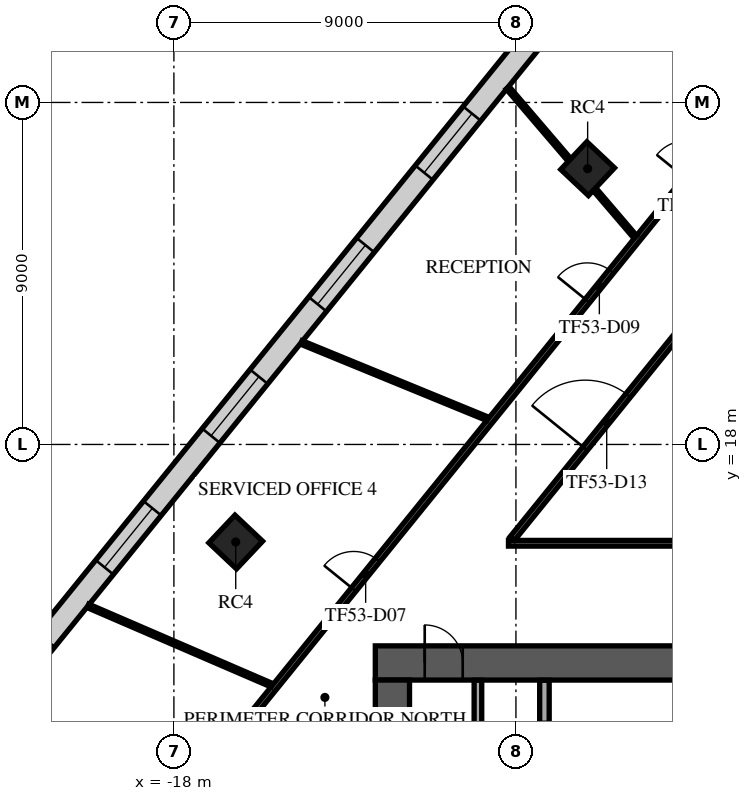
"""IFC4 building model, lengths in metres.
Left out: names, types, materials, properties, quantities, classifications, styles, units other than length and angle.
Written with IfcOpenShell. Run it as: python <this file> out.ifc"""

import sys

from ifc_helpers import new_model, si_unit, direction, frame, frame_2d, origin, origin_2d, place, context, subcontext, project, spatial, rectangle, extrude, element, fill, save


model = new_model("IFC4")
c1 = context("Model", 3, precision=1e-05, world=origin(), true_north=direction((0.0, 1.0)))
c2 = subcontext(c1, "Body", "Model", "MODEL_VIEW")
j1 = project(units=[si_unit("LENGTHUNIT", "METRE"), si_unit("PLANEANGLEUNIT", "RADIAN")], contexts=[c1])
p1 = place(None, origin())
s1 = spatial("IfcSite", under=j1, at=p1, CompositionType="ELEMENT")
p2 = place(p1, origin())
s2 = spatial("IfcBuilding", under=s1, at=p2, CompositionType="ELEMENT")
p3 = place(p2, frame((0.0, 0.0, 225.3)))
s3 = spatial("IfcBuildingStorey", under=s2, at=p3, CompositionType="ELEMENT", Elevation=225.3)
for number, where, z_axis, x_axis in (
    (1, (-7.113, 25.257, 0.0), (0.0, 0.0, 1.0), (0.686, 0.728, 0.0)),
    (2, (-16.373, 15.433, 0.0), (0.0, 0.0, 1.0), (0.686, 0.728, 0.0)),
):
    element("IfcColumn", number, at=place(p3, frame(where, z_axis=z_axis, x_axis=x_axis)), inside=s3, PredefinedType="COLUMN", context=c2, shape_type="SweptSolid", body=[
        extrude(rectangle(XDim=1.0, YDim=1.0, at=origin_2d()), origin(), (0.0, 0.0, 1.0), 4.0),
    ])
p4 = place(p3, frame((-12.7, 12.25, 0.0), z_axis=(0.0, 0.0, 1.0), x_axis=(1.0, 0.0, 0.0)))
e3 = element("IfcWall", 3, at=p4, inside=s3, PredefinedType="SHEAR", context=c2, shape_type="SweptSolid", body=[
    extrude(rectangle(XDim=25.4, YDim=0.9, at=frame_2d((12.7, 0.0))), origin(), (0.0, 0.0, 1.0), 3.62),
])
p5 = place(p4, frame((11.5, 0.0, 0.0)))
e4 = element("IfcOpeningElement", 4, at=p5, cuts=e3, PredefinedType="OPENING", context=c2, shape_type="SweptSolid", body=[
    extrude(rectangle(XDim=2.4, YDim=2.4, at=frame_2d((1.2, 1.2))), frame((0.0, 0.46, 0.0), z_axis=(0.0, -1.0, 0.0), x_axis=(1.0, 0.0, 0.0)), (0.0, 0.0, 1.0), 0.92),
])
p6 = place(p4, frame((22.325, 0.0, 0.0)))
e5 = element("IfcOpeningElement", 5, at=p6, cuts=e3, PredefinedType="OPENING", context=c2, shape_type="SweptSolid", body=[
    extrude(rectangle(XDim=1.2, YDim=2.1, at=frame_2d((0.6, 1.05))), frame((0.0, 0.46, 0.0), z_axis=(0.0, -1.0, 0.0), x_axis=(1.0, 0.0, 0.0)), (0.0, 0.0, 1.0), 0.92),
])
p7 = place(p4, frame((1.3, 0.0, 0.0)))
e6 = element("IfcOpeningElement", 6, at=p7, cuts=e3, PredefinedType="OPENING", context=c2, shape_type="SweptSolid", body=[
    extrude(rectangle(XDim=1.0, YDim=2.1, at=frame_2d((0.5, 1.05))), frame((0.0, 0.46, 0.0), z_axis=(0.0, -1.0, 0.0), x_axis=(1.0, 0.0, 0.0)), (0.0, 0.0, 1.0), 0.92),
])
p8 = place(p3, frame((-12.25, -11.8, 0.0), z_axis=(0.0, 0.0, 1.0), x_axis=(0.0, 1.0, 0.0)))
e7 = element("IfcWall", 7, at=p8, inside=s3, PredefinedType="SHEAR", context=c2, shape_type="SweptSolid", body=[
    extrude(rectangle(XDim=23.6, YDim=0.9, at=frame_2d((11.8, 0.0))), origin(), (0.0, 0.0, 1.0), 3.62),
])
p9 = place(p8, frame((10.6, 0.0, 0.0)))
e8 = element("IfcOpeningElement", 8, at=p9, cuts=e7, PredefinedType="OPENING", context=c2, shape_type="SweptSolid", body=[
    extrude(rectangle(XDim=2.4, YDim=2.4, at=frame_2d((1.2, 1.2))), frame((0.0, 0.46, 0.0), z_axis=(0.0, -1.0, 0.0), x_axis=(1.0, 0.0, 0.0)), (0.0, 0.0, 1.0), 0.92),
])
p10 = place(p3, frame((-10.0, 4.78, 0.0), z_axis=(0.0, 0.0, 1.0), x_axis=(0.0, 1.0, 0.0)))
e9 = element("IfcWall", 9, at=p10, inside=s3, PredefinedType="PARTITIONING", context=c2, shape_type="SweptSolid", body=[
    extrude(rectangle(XDim=7.015, YDim=0.2, at=frame_2d((3.507, 0.0))), origin(), (0.0, 0.0, 1.0), 3.62),
])
p11 = place(p10, frame((2.92, 0.0, 0.0)))
e10 = element("IfcOpeningElement", 10, at=p11, cuts=e9, PredefinedType="OPENING", context=c2, shape_type="SweptSolid", body=[
    extrude(rectangle(XDim=1.0, YDim=2.1, at=frame_2d((0.5, 1.05))), frame((0.0, 0.11, 0.0), z_axis=(0.0, -1.0, 0.0), x_axis=(1.0, 0.0, 0.0)), (0.0, 0.0, 1.0), 0.22),
])
p12 = place(p3, frame((-8.25, 8.805, 0.0), z_axis=(0.0, 0.0, 1.0), x_axis=(0.0, 1.0, 0.0)))
e11 = element("IfcWall", 11, at=p12, inside=s3, PredefinedType="PARTITIONING", context=c2, shape_type="SweptSolid", body=[
    extrude(rectangle(XDim=2.99, YDim=0.25, at=frame_2d((1.495, 0.0))), origin(), (0.0, 0.0, 1.0), 3.62),
])
p13 = place(p12, frame((0.895, 0.0, 0.0)))
e12 = element("IfcOpeningElement", 12, at=p13, cuts=e11, PredefinedType="OPENING", context=c2, shape_type="SweptSolid", body=[
    extrude(rectangle(XDim=1.0, YDim=2.1, at=frame_2d((0.5, 1.05))), frame((0.0, 0.135, 0.0), z_axis=(0.0, -1.0, 0.0), x_axis=(1.0, 0.0, 0.0)), (0.0, 0.0, 1.0), 0.27),
])
p14 = place(p3, frame((-3.777, 34.584, 0.0), z_axis=(0.0, 0.0, 1.0), x_axis=(-0.629323778295, -0.777143218508, 0.0)))
e13 = element("IfcWall", 13, at=p14, inside=s3, PredefinedType="STANDARD", context=c2, shape_type="SweptSolid", body=[
    extrude(rectangle(XDim=49.0, YDim=0.6, at=frame_2d((24.5, 0.0))), origin(), (0.0, 0.0, 1.0), 3.62),
])
p15 = place(p14, frame((1.227, 0.0, 0.9)))
e14 = element("IfcOpeningElement", 14, at=p15, cuts=e13, PredefinedType="OPENING", context=c2, shape_type="SweptSolid", body=[
    extrude(rectangle(XDim=2.0, YDim=2.1, at=frame_2d((1.0, 1.05))), frame((0.0, 0.31, 0.0), z_axis=(0.0, -1.0, 0.0), x_axis=(1.0, 0.0, 0.0)), (0.0, 0.0, 1.0), 0.62),
])
p16 = place(p14, frame((5.682, 0.0, 0.9)))
e15 = element("IfcOpeningElement", 15, at=p16, cuts=e13, PredefinedType="OPENING", context=c2, shape_type="SweptSolid", body=[
    extrude(rectangle(XDim=2.0, YDim=2.1, at=frame_2d((1.0, 1.05))), frame((0.0, 0.31, 0.0), z_axis=(0.0, -1.0, 0.0), x_axis=(1.0, 0.0, 0.0)), (0.0, 0.0, 1.0), 0.62),
])
p17 = place(p14, frame((10.136, 0.0, 0.9)))
e16 = element("IfcOpeningElement", 16, at=p17, cuts=e13, PredefinedType="OPENING", context=c2, shape_type="SweptSolid", body=[
    extrude(rectangle(XDim=2.0, YDim=2.1, at=frame_2d((1.0, 1.05))), frame((0.0, 0.31, 0.0), z_axis=(0.0, -1.0, 0.0), x_axis=(1.0, 0.0, 0.0)), (0.0, 0.0, 1.0), 0.62),
])
p18 = place(p14, frame((14.591, 0.0, 0.9)))
e17 = element("IfcOpeningElement", 17, at=p18, cuts=e13, PredefinedType="OPENING", context=c2, shape_type="SweptSolid", body=[
    extrude(rectangle(XDim=2.0, YDim=2.1, at=frame_2d((1.0, 1.05))), frame((0.0, 0.31, 0.0), z_axis=(0.0, -1.0, 0.0), x_axis=(1.0, 0.0, 0.0)), (0.0, 0.0, 1.0), 0.62),
])
p19 = place(p14, frame((19.045, 0.0, 0.9)))
e18 = element("IfcOpeningElement", 18, at=p19, cuts=e13, PredefinedType="OPENING", context=c2, shape_type="SweptSolid", body=[
    extrude(rectangle(XDim=2.0, YDim=2.1, at=frame_2d((1.0, 1.05))), frame((0.0, 0.31, 0.0), z_axis=(0.0, -1.0, 0.0), x_axis=(1.0, 0.0, 0.0)), (0.0, 0.0, 1.0), 0.62),
])
p20 = place(p14, frame((23.5, 0.0, 0.9)))
e19 = element("IfcOpeningElement", 19, at=p20, cuts=e13, PredefinedType="OPENING", context=c2, shape_type="SweptSolid", body=[
    extrude(rectangle(XDim=2.0, YDim=2.1, at=frame_2d((1.0, 1.05))), frame((0.0, 0.31, 0.0), z_axis=(0.0, -1.0, 0.0), x_axis=(1.0, 0.0, 0.0)), (0.0, 0.0, 1.0), 0.62),
])
p21 = place(p14, frame((27.955, 0.0, 0.9)))
e20 = element("IfcOpeningElement", 20, at=p21, cuts=e13, PredefinedType="OPENING", context=c2, shape_type="SweptSolid", body=[
    extrude(rectangle(XDim=2.0, YDim=2.1, at=frame_2d((1.0, 1.05))), frame((0.0, 0.31, 0.0), z_axis=(0.0, -1.0, 0.0), x_axis=(1.0, 0.0, 0.0)), (0.0, 0.0, 1.0), 0.62),
])
p22 = place(p14, frame((32.409, 0.0, 0.9)))
e21 = element("IfcOpeningElement", 21, at=p22, cuts=e13, PredefinedType="OPENING", context=c2, shape_type="SweptSolid", body=[
    extrude(rectangle(XDim=2.0, YDim=2.1, at=frame_2d((1.0, 1.05))), frame((0.0, 0.31, 0.0), z_axis=(0.0, -1.0, 0.0), x_axis=(1.0, 0.0, 0.0)), (0.0, 0.0, 1.0), 0.62),
])
p23 = place(p14, frame((36.864, 0.0, 0.9)))
e22 = element("IfcOpeningElement", 22, at=p23, cuts=e13, PredefinedType="OPENING", context=c2, shape_type="SweptSolid", body=[
    extrude(rectangle(XDim=2.0, YDim=2.1, at=frame_2d((1.0, 1.05))), frame((0.0, 0.31, 0.0), z_axis=(0.0, -1.0, 0.0), x_axis=(1.0, 0.0, 0.0)), (0.0, 0.0, 1.0), 0.62),
])
p24 = place(p14, frame((41.318, 0.0, 0.9)))
e23 = element("IfcOpeningElement", 23, at=p24, cuts=e13, PredefinedType="OPENING", context=c2, shape_type="SweptSolid", body=[
    extrude(rectangle(XDim=2.0, YDim=2.1, at=frame_2d((1.0, 1.05))), frame((0.0, 0.31, 0.0), z_axis=(0.0, -1.0, 0.0), x_axis=(1.0, 0.0, 0.0)), (0.0, 0.0, 1.0), 0.62),
])
p25 = place(p14, frame((45.773, 0.0, 0.9)))
e24 = element("IfcOpeningElement", 24, at=p25, cuts=e13, PredefinedType="OPENING", context=c2, shape_type="SweptSolid", body=[
    extrude(rectangle(XDim=2.0, YDim=2.1, at=frame_2d((1.0, 1.05))), frame((0.0, 0.31, 0.0), z_axis=(0.0, -1.0, 0.0), x_axis=(1.0, 0.0, 0.0)), (0.0, 0.0, 1.0), 0.62),
])
p26 = place(p3, frame((-26.769, -2.487, 0.0), z_axis=(0.0, 0.0, 1.0), x_axis=(0.629320703929, 0.777145708092, 0.0)))
e25 = element("IfcWall", 25, at=p26, inside=s3, PredefinedType="PARTITIONING", context=c2, shape_type="SweptSolid", body=[
    extrude(rectangle(XDim=37.558, YDim=0.15, at=frame_2d((18.779, 0.0))), origin(), (0.0, 0.0, 1.0), 2.97),
])
p27 = place(p26, frame((3.55, 0.0, 0.0)))
e26 = element("IfcOpeningElement", 26, at=p27, cuts=e25, PredefinedType="OPENING", context=c2, shape_type="SweptSolid", body=[
    extrude(rectangle(XDim=1.0, YDim=2.1, at=frame_2d((0.5, 1.05))), frame((0.0, 0.085, 0.0), z_axis=(0.0, -1.0, 0.0), x_axis=(1.0, 0.0, 0.0)), (0.0, 0.0, 1.0), 0.17),
])
p28 = place(p26, frame((11.862, 0.0, 0.0)))
e27 = element("IfcOpeningElement", 27, at=p28, cuts=e25, PredefinedType="OPENING", context=c2, shape_type="SweptSolid", body=[
    extrude(rectangle(XDim=1.0, YDim=2.1, at=frame_2d((0.5, 1.05))), frame((0.0, 0.085, 0.0), z_axis=(0.0, -1.0, 0.0), x_axis=(1.0, 0.0, 0.0)), (0.0, 0.0, 1.0), 0.17),
])
p29 = place(p26, frame((21.452, 0.0, 0.0)))
e28 = element("IfcOpeningElement", 28, at=p29, cuts=e25, PredefinedType="OPENING", context=c2, shape_type="SweptSolid", body=[
    extrude(rectangle(XDim=1.0, YDim=2.1, at=frame_2d((0.5, 1.05))), frame((0.0, 0.085, 0.0), z_axis=(0.0, -1.0, 0.0), x_axis=(1.0, 0.0, 0.0)), (0.0, 0.0, 1.0), 0.17),
])
p30 = place(p26, frame((31.223, 0.0, 0.0)))
e29 = element("IfcOpeningElement", 29, at=p30, cuts=e25, PredefinedType="OPENING", context=c2, shape_type="SweptSolid", body=[
    extrude(rectangle(XDim=1.0, YDim=2.1, at=frame_2d((0.5, 1.05))), frame((0.0, 0.085, 0.0), z_axis=(0.0, -1.0, 0.0), x_axis=(1.0, 0.0, 0.0)), (0.0, 0.0, 1.0), 0.17),
])
p31 = place(p26, frame((35.359, 0.0, 0.0)))
e30 = element("IfcOpeningElement", 30, at=p31, cuts=e25, PredefinedType="OPENING", context=c2, shape_type="SweptSolid", body=[
    extrude(rectangle(XDim=1.0, YDim=2.1, at=frame_2d((0.5, 1.05))), frame((0.0, 0.085, 0.0), z_axis=(0.0, -1.0, 0.0), x_axis=(1.0, 0.0, 0.0)), (0.0, 0.0, 1.0), 0.17),
])
p32 = place(p3, frame((-9.196, 15.4, 0.0), z_axis=(0.0, 0.0, 1.0), x_axis=(1.0, 0.0, 0.0)))
e31 = element("IfcWall", 31, at=p32, inside=s3, PredefinedType="PARTITIONING", context=c2, shape_type="SweptSolid", body=[
    extrude(rectangle(XDim=18.06, YDim=0.15, at=frame_2d((9.03, 0.0))), origin(), (0.0, 0.0, 1.0), 3.17),
])
p33 = place(p32, frame((12.621, 0.0, 0.0)))
e32 = element("IfcOpeningElement", 32, at=p33, cuts=e31, PredefinedType="OPENING", context=c2, shape_type="SweptSolid", body=[
    extrude(rectangle(XDim=1.0, YDim=2.1, at=frame_2d((0.5, 1.05))), frame((0.0, 0.085, 0.0), z_axis=(0.0, -1.0, 0.0), x_axis=(1.0, 0.0, 0.0)), (0.0, 0.0, 1.0), 0.17),
])
p34 = place(p3, frame((-9.097, 15.522, 0.0), z_axis=(0.0, 0.0, 1.0), x_axis=(0.629294773149, 0.777166705725, 0.0)))
e33 = element("IfcWall", 33, at=p34, inside=s3, PredefinedType="PARTITIONING", context=c2, shape_type="SweptSolid", body=[
    extrude(rectangle(XDim=12.366, YDim=0.15, at=frame_2d((6.183, 0.0))), origin(), (0.0, 0.0, 1.0), 3.17),
])
p35 = place(p34, frame((3.05, 0.0, 0.0)))
e34 = element("IfcOpeningElement", 34, at=p35, cuts=e33, PredefinedType="OPENING", context=c2, shape_type="SweptSolid", body=[
    extrude(rectangle(XDim=1.8, YDim=2.1, at=frame_2d((0.9, 1.05))), frame((0.0, 0.085, 0.0), z_axis=(0.0, -1.0, 0.0), x_axis=(1.0, 0.0, 0.0)), (0.0, 0.0, 1.0), 0.17),
])
p36 = place(p3, frame((-20.259, 13.751, 0.0), z_axis=(0.0, 0.0, 1.0), x_axis=(0.918139792182, -0.396256636553, 0.0)))
e35 = element("IfcWall", 35, at=p36, inside=s3, PredefinedType="PARTITIONING", context=c2, shape_type="SweptSolid", body=[
    extrude(rectangle(XDim=5.267, YDim=0.1, at=frame_2d((2.633, 0.0))), origin(), (0.0, 0.0, 1.0), 2.97),
])
p37 = place(p3, frame((-14.645, 20.684, 0.0), z_axis=(0.0, 0.0, 1.0), x_axis=(0.925219687535, -0.379431851321, 0.0)))
e36 = element("IfcWall", 36, at=p37, inside=s3, PredefinedType="PARTITIONING", context=c2, shape_type="SweptSolid", body=[
    extrude(rectangle(XDim=5.293, YDim=0.1, at=frame_2d((2.647, 0.0))), origin(), (0.0, 0.0, 1.0), 2.97),
])
p38 = place(p3, frame((-9.217, 27.387, 0.0), z_axis=(0.0, 0.0, 1.0), x_axis=(0.649924567032, -0.75999872182, 0.0)))
e37 = element("IfcWall", 37, at=p38, inside=s3, PredefinedType="PARTITIONING", context=c2, shape_type="SweptSolid", body=[
    extrude(rectangle(XDim=2.506, YDim=0.1, at=frame_2d((1.253, 0.0))), origin(), (0.0, 0.0, 1.0), 3.62),
])
p39 = place(p3, frame((-6.935, 24.717, 0.0), z_axis=(0.0, 0.0, 1.0), x_axis=(0.650047373703, -0.759893684631, 0.0)))
e38 = element("IfcWall", 38, at=p39, inside=s3, PredefinedType="PARTITIONING", context=c2, shape_type="SweptSolid", body=[
    extrude(rectangle(XDim=1.649, YDim=0.1, at=frame_2d((0.825, 0.0))), origin(), (0.0, 0.0, 1.0), 3.17),
])
p40 = place(p7, origin())
e39 = element("IfcDoor", 39, at=p40, inside=s3, OperationType="SINGLE_SWING_LEFT", PredefinedType="DOOR", context=c2, shape_type="SweptSolid", body=[
    extrude(rectangle(XDim=1.0, YDim=2.1, at=frame_2d((0.5, 1.05))), frame((0.0, 0.025, 0.0), z_axis=(0.0, -1.0, 0.0), x_axis=(1.0, 0.0, 0.0)), (0.0, 0.0, 1.0), 0.05),
])
fill(e6, e39)
p41 = place(p17, origin())
e40 = element("IfcWindow", 40, at=p41, inside=s3, PartitioningType="SINGLE_PANEL", PredefinedType="WINDOW", context=c2, shape_type="SweptSolid", body=[
    extrude(rectangle(XDim=2.0, YDim=2.1, at=frame_2d((1.0, 1.05))), frame((0.0, 0.03, 0.0), z_axis=(0.0, -1.0, 0.0), x_axis=(1.0, 0.0, 0.0)), (0.0, 0.0, 1.0), 0.06),
])
fill(e16, e40)
p42 = place(p18, origin())
e41 = element("IfcWindow", 41, at=p42, inside=s3, PartitioningType="SINGLE_PANEL", PredefinedType="WINDOW", context=c2, shape_type="SweptSolid", body=[
    extrude(rectangle(XDim=2.0, YDim=2.1, at=frame_2d((1.0, 1.05))), frame((0.0, 0.03, 0.0), z_axis=(0.0, -1.0, 0.0), x_axis=(1.0, 0.0, 0.0)), (0.0, 0.0, 1.0), 0.06),
])
fill(e17, e41)
p43 = place(p19, origin())
e42 = element("IfcWindow", 42, at=p43, inside=s3, PartitioningType="SINGLE_PANEL", PredefinedType="WINDOW", context=c2, shape_type="SweptSolid", body=[
    extrude(rectangle(XDim=2.0, YDim=2.1, at=frame_2d((1.0, 1.05))), frame((0.0, 0.03, 0.0), z_axis=(0.0, -1.0, 0.0), x_axis=(1.0, 0.0, 0.0)), (0.0, 0.0, 1.0), 0.06),
])
fill(e18, e42)
p44 = place(p20, origin())
e43 = element("IfcWindow", 43, at=p44, inside=s3, PartitioningType="SINGLE_PANEL", PredefinedType="WINDOW", context=c2, shape_type="SweptSolid", body=[
    extrude(rectangle(XDim=2.0, YDim=2.1, at=frame_2d((1.0, 1.05))), frame((0.0, 0.03, 0.0), z_axis=(0.0, -1.0, 0.0), x_axis=(1.0, 0.0, 0.0)), (0.0, 0.0, 1.0), 0.06),
])
fill(e19, e43)
p45 = place(p29, origin())
e44 = element("IfcDoor", 44, at=p45, inside=s3, OperationType="SINGLE_SWING_RIGHT", PredefinedType="DOOR", context=c2, shape_type="SweptSolid", body=[
    extrude(rectangle(XDim=1.0, YDim=2.1, at=frame_2d((0.5, 1.05))), frame((0.0, 0.025, 0.0), z_axis=(0.0, -1.0, 0.0), x_axis=(1.0, 0.0, 0.0)), (0.0, 0.0, 1.0), 0.05),
])
fill(e28, e44)
p46 = place(p30, origin())
e45 = element("IfcDoor", 45, at=p46, inside=s3, OperationType="SINGLE_SWING_RIGHT", PredefinedType="DOOR", context=c2, shape_type="SweptSolid", body=[
    extrude(rectangle(XDim=1.0, YDim=2.1, at=frame_2d((0.5, 1.05))), frame((0.0, 0.025, 0.0), z_axis=(0.0, -1.0, 0.0), x_axis=(1.0, 0.0, 0.0)), (0.0, 0.0, 1.0), 0.05),
])
fill(e29, e45)
p47 = place(p35, frame((1.8, 0.0, 0.0), z_axis=(0.0, 0.0, 1.0), x_axis=(-1.0, 0.0, 0.0)))
e46 = element("IfcDoor", 46, at=p47, inside=s3, OperationType="DOUBLE_DOOR_SINGLE_SWING", PredefinedType="DOOR", context=c2, shape_type="SweptSolid", body=[
    extrude(rectangle(XDim=1.8, YDim=2.1, at=frame_2d((0.9, 1.05))), frame((0.0, 0.025, 0.0), z_axis=(0.0, -1.0, 0.0), x_axis=(1.0, 0.0, 0.0)), (0.0, 0.0, 1.0), 0.05),
])
fill(e34, e46)
save(model, sys.argv[1])
